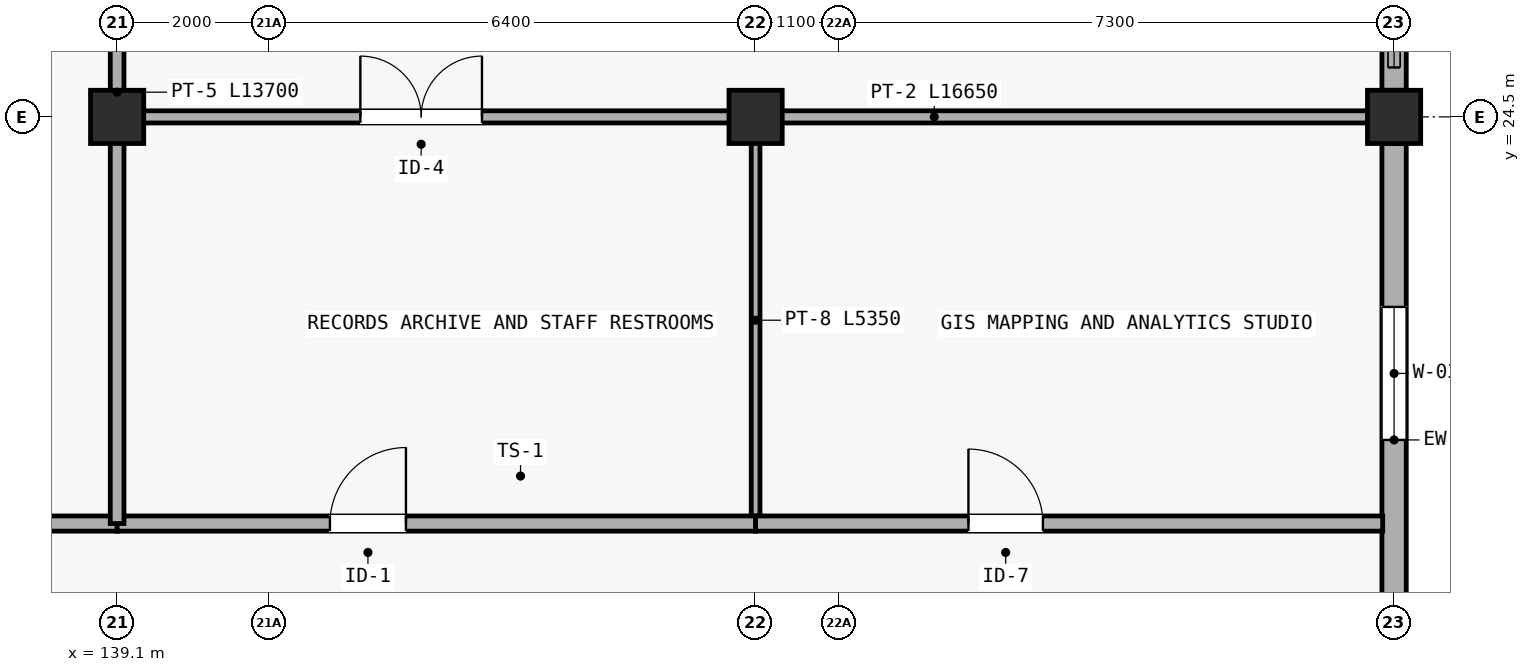
"""IFC4 building model, lengths in metres.
Left out: names, types, materials, properties, quantities, classifications, styles, units other than length and angle.
Written with IfcOpenShell. Run it as: python <this file> out.ifc"""

import sys

from ifc_helpers import new_model, si_unit, direction, frame, frame_2d, origin, origin_2d, place, context, subcontext, project, spatial, rectangle, extrude, element, fill, save


model = new_model("IFC4")
c1 = context("Model", 3, precision=1e-05, world=origin(), true_north=direction((0.0, 1.0)))
c2 = subcontext(c1, "Body", "Model", "MODEL_VIEW")
j1 = project(units=[si_unit("LENGTHUNIT", "METRE"), si_unit("PLANEANGLEUNIT", "RADIAN")], contexts=[c1])
p1 = place(None, origin())
s1 = spatial("IfcSite", under=j1, at=p1, CompositionType="ELEMENT")
p2 = place(p1, origin())
s2 = spatial("IfcBuilding", under=s1, at=p2, CompositionType="ELEMENT")
p3 = place(p2, frame((0.0, 0.0, 5.85)))
s3 = spatial("IfcBuildingStorey", under=s2, at=p3, CompositionType="ELEMENT", Elevation=5.85)
for number, where, z_axis, x_axis in (
    (1, (139.1, 24.5, 0.0), (0.0, 0.0, 1.0), (1.0, 0.0, 0.0)),
    (2, (147.5, 24.5, 0.0), (0.0, 0.0, 1.0), (1.0, 0.0, 0.0)),
    (3, (155.9, 24.5, 0.0), (0.0, 0.0, 1.0), (1.0, 0.0, 0.0)),
):
    element("IfcColumn", number, at=place(p3, frame(where, z_axis=z_axis, x_axis=x_axis)), inside=s3, PredefinedType="COLUMN", context=c2, shape_type="SweptSolid", body=[
        extrude(rectangle(XDim=0.7, YDim=0.7, at=origin_2d()), origin(), (0.0, 0.0, 1.0), 3.45),
    ])
p4 = place(p3, frame((155.9, 16.35, 0.0), z_axis=(0.0, 0.0, 1.0), x_axis=(0.0, 1.0, 0.0)))
e4 = element("IfcWall", 4, at=p4, inside=s3, PredefinedType="STANDARD", context=c2, shape_type="SweptSolid", body=[
    extrude(rectangle(XDim=7.8, YDim=0.32, at=frame_2d((3.9, 0.0))), origin(), (0.0, 0.0, 1.0), 2.7),
])
p5 = place(p4, frame((3.9, 0.0, 0.75)))
e5 = element("IfcOpeningElement", 5, at=p5, cuts=e4, PredefinedType="OPENING", context=c2, shape_type="SweptSolid", body=[
    extrude(rectangle(XDim=1.75, YDim=1.55, at=frame_2d((0.875, 0.775))), frame((0.0, 0.17, 0.0), z_axis=(0.0, -1.0, 0.0), x_axis=(1.0, 0.0, 0.0)), (0.0, 0.0, 1.0), 0.34),
])
p6 = place(p3, frame((155.9, 24.85, 0.0), z_axis=(0.0, 0.0, 1.0), x_axis=(0.0, 1.0, 0.0)))
e6 = element("IfcWall", 6, at=p6, inside=s3, PredefinedType="STANDARD", context=c2, shape_type="SweptSolid", body=[
    extrude(rectangle(XDim=7.8, YDim=0.32, at=frame_2d((3.9, 0.0))), origin(), (0.0, 0.0, 1.0), 2.7),
])
p7 = place(p3, frame((139.1, 24.5, 0.0), z_axis=(0.0, 0.0, 1.0), x_axis=(1.0, 0.0, 0.0)))
e7 = element("IfcWall", 7, at=p7, inside=s3, PredefinedType="PARTITIONING", context=c2, shape_type="SweptSolid", body=[
    extrude(rectangle(XDim=16.65, YDim=0.16, at=frame_2d((8.325, 0.0))), origin(), (0.0, 0.0, 1.0), 2.65),
])
p8 = place(p7, frame((3.2, 0.0, 0.0)))
e8 = element("IfcOpeningElement", 8, at=p8, cuts=e7, PredefinedType="OPENING", context=c2, shape_type="SweptSolid", body=[
    extrude(rectangle(XDim=1.6, YDim=2.14, at=frame_2d((0.8, 1.07))), frame((0.0, 0.09, 0.0), z_axis=(0.0, -1.0, 0.0), x_axis=(1.0, 0.0, 0.0)), (0.0, 0.0, 1.0), 0.18),
])
p9 = place(p3, frame((147.5, 19.15, 0.0), z_axis=(0.0, 0.0, 1.0), x_axis=(0.0, 1.0, 0.0)))
e9 = element("IfcWall", 9, at=p9, inside=s3, PredefinedType="PARTITIONING", context=c2, shape_type="SweptSolid", body=[
    extrude(rectangle(XDim=5.35, YDim=0.115, at=frame_2d((2.675, 0.0))), origin(), (0.0, 0.0, 1.0), 2.65),
])
p10 = place(p3, frame((122.3, 19.15, 0.0), z_axis=(0.0, 0.0, 1.0), x_axis=(1.0, 0.0, 0.0)))
e10 = element("IfcWall", 10, at=p10, inside=s3, PredefinedType="PARTITIONING", context=c2, shape_type="SweptSolid", body=[
    extrude(rectangle(XDim=16.8, YDim=0.2, at=frame_2d((8.4, 0.0))), origin(), (0.0, 0.0, 1.0), 2.65),
])
p11 = place(p10, frame((2.8, 0.0, 0.0)))
e11 = element("IfcOpeningElement", 11, at=p11, cuts=e10, PredefinedType="OPENING", context=c2, shape_type="SweptSolid", body=[
    extrude(rectangle(XDim=1.5, YDim=2.15, at=frame_2d((0.75, 1.075))), frame((0.0, 0.11, 0.0), z_axis=(0.0, -1.0, 0.0), x_axis=(1.0, 0.0, 0.0)), (0.0, 0.0, 1.0), 0.22),
])
p12 = place(p10, frame((13.0, 0.0, 0.0)))
e12 = element("IfcOpeningElement", 12, at=p12, cuts=e10, PredefinedType="OPENING", context=c2, shape_type="SweptSolid", body=[
    extrude(rectangle(XDim=1.0, YDim=2.12, at=frame_2d((0.5, 1.06))), frame((0.0, 0.11, 0.0), z_axis=(0.0, -1.0, 0.0), x_axis=(1.0, 0.0, 0.0)), (0.0, 0.0, 1.0), 0.22),
])
p13 = place(p3, frame((139.1, 19.15, 0.0), z_axis=(0.0, 0.0, 1.0), x_axis=(1.0, 0.0, 0.0)))
e13 = element("IfcWall", 13, at=p13, inside=s3, PredefinedType="PARTITIONING", context=c2, shape_type="SweptSolid", body=[
    extrude(rectangle(XDim=8.4, YDim=0.2, at=frame_2d((4.2, 0.0))), origin(), (0.0, 0.0, 1.0), 2.65),
])
p14 = place(p13, frame((2.8, 0.0, 0.0)))
e14 = element("IfcOpeningElement", 14, at=p14, cuts=e13, PredefinedType="OPENING", context=c2, shape_type="SweptSolid", body=[
    extrude(rectangle(XDim=1.0, YDim=2.12, at=frame_2d((0.5, 1.06))), frame((0.0, 0.11, 0.0), z_axis=(0.0, -1.0, 0.0), x_axis=(1.0, 0.0, 0.0)), (0.0, 0.0, 1.0), 0.22),
])
p15 = place(p3, frame((147.5, 19.15, 0.0), z_axis=(0.0, 0.0, 1.0), x_axis=(1.0, 0.0, 0.0)))
e15 = element("IfcWall", 15, at=p15, inside=s3, PredefinedType="PARTITIONING", context=c2, shape_type="SweptSolid", body=[
    extrude(rectangle(XDim=8.25, YDim=0.2, at=frame_2d((4.125, 0.0))), origin(), (0.0, 0.0, 1.0), 2.65),
])
p16 = place(p15, frame((2.8, 0.0, 0.0)))
e16 = element("IfcOpeningElement", 16, at=p16, cuts=e15, PredefinedType="OPENING", context=c2, shape_type="SweptSolid", body=[
    extrude(rectangle(XDim=0.98, YDim=2.12, at=frame_2d((0.49, 1.06))), frame((0.0, 0.11, 0.0), z_axis=(0.0, -1.0, 0.0), x_axis=(1.0, 0.0, 0.0)), (0.0, 0.0, 1.0), 0.22),
])
p17 = place(p3, frame((139.1, 19.15, 0.0), z_axis=(0.0, 0.0, 1.0), x_axis=(0.0, 1.0, 0.0)))
e17 = element("IfcWall", 17, at=p17, inside=s3, PredefinedType="PARTITIONING", context=c2, shape_type="SweptSolid", body=[
    extrude(rectangle(XDim=13.7, YDim=0.18, at=frame_2d((6.85, 0.0))), origin(), (0.0, 0.0, 1.0), 2.65),
])
p18 = place(p5, origin())
e18 = element("IfcWindow", 18, at=p18, inside=s3, PartitioningType="DOUBLE_PANEL_VERTICAL", PredefinedType="WINDOW", context=c2, shape_type="SweptSolid", body=[
    extrude(rectangle(XDim=1.75, YDim=1.55, at=frame_2d((0.875, 0.775))), frame((0.0, 0.03, 0.0), z_axis=(0.0, -1.0, 0.0), x_axis=(1.0, 0.0, 0.0)), (0.0, 0.0, 1.0), 0.06),
])
fill(e5, e18)
p19 = place(p8, origin())
e19 = element("IfcDoor", 19, at=p19, inside=s3, OperationType="DOUBLE_DOOR_SINGLE_SWING", PredefinedType="DOOR", context=c2, shape_type="SweptSolid", body=[
    extrude(rectangle(XDim=1.6, YDim=2.14, at=frame_2d((0.8, 1.07))), frame((0.0, 0.025, 0.0), z_axis=(0.0, -1.0, 0.0), x_axis=(1.0, 0.0, 0.0)), (0.0, 0.0, 1.0), 0.05),
])
fill(e8, e19)
p20 = place(p14, origin())
e20 = element("IfcDoor", 20, at=p20, inside=s3, OperationType="SINGLE_SWING_RIGHT", PredefinedType="DOOR", context=c2, shape_type="SweptSolid", body=[
    extrude(rectangle(XDim=1.0, YDim=2.12, at=frame_2d((0.5, 1.06))), frame((0.0, 0.025, 0.0), z_axis=(0.0, -1.0, 0.0), x_axis=(1.0, 0.0, 0.0)), (0.0, 0.0, 1.0), 0.05),
])
fill(e14, e20)
p21 = place(p16, origin())
e21 = element("IfcDoor", 21, at=p21, inside=s3, OperationType="SINGLE_SWING_LEFT", PredefinedType="DOOR", context=c2, shape_type="SweptSolid", body=[
    extrude(rectangle(XDim=0.98, YDim=2.12, at=frame_2d((0.49, 1.06))), frame((0.0, 0.025, 0.0), z_axis=(0.0, -1.0, 0.0), x_axis=(1.0, 0.0, 0.0)), (0.0, 0.0, 1.0), 0.05),
])
fill(e16, e21)
save(model, sys.argv[1])
